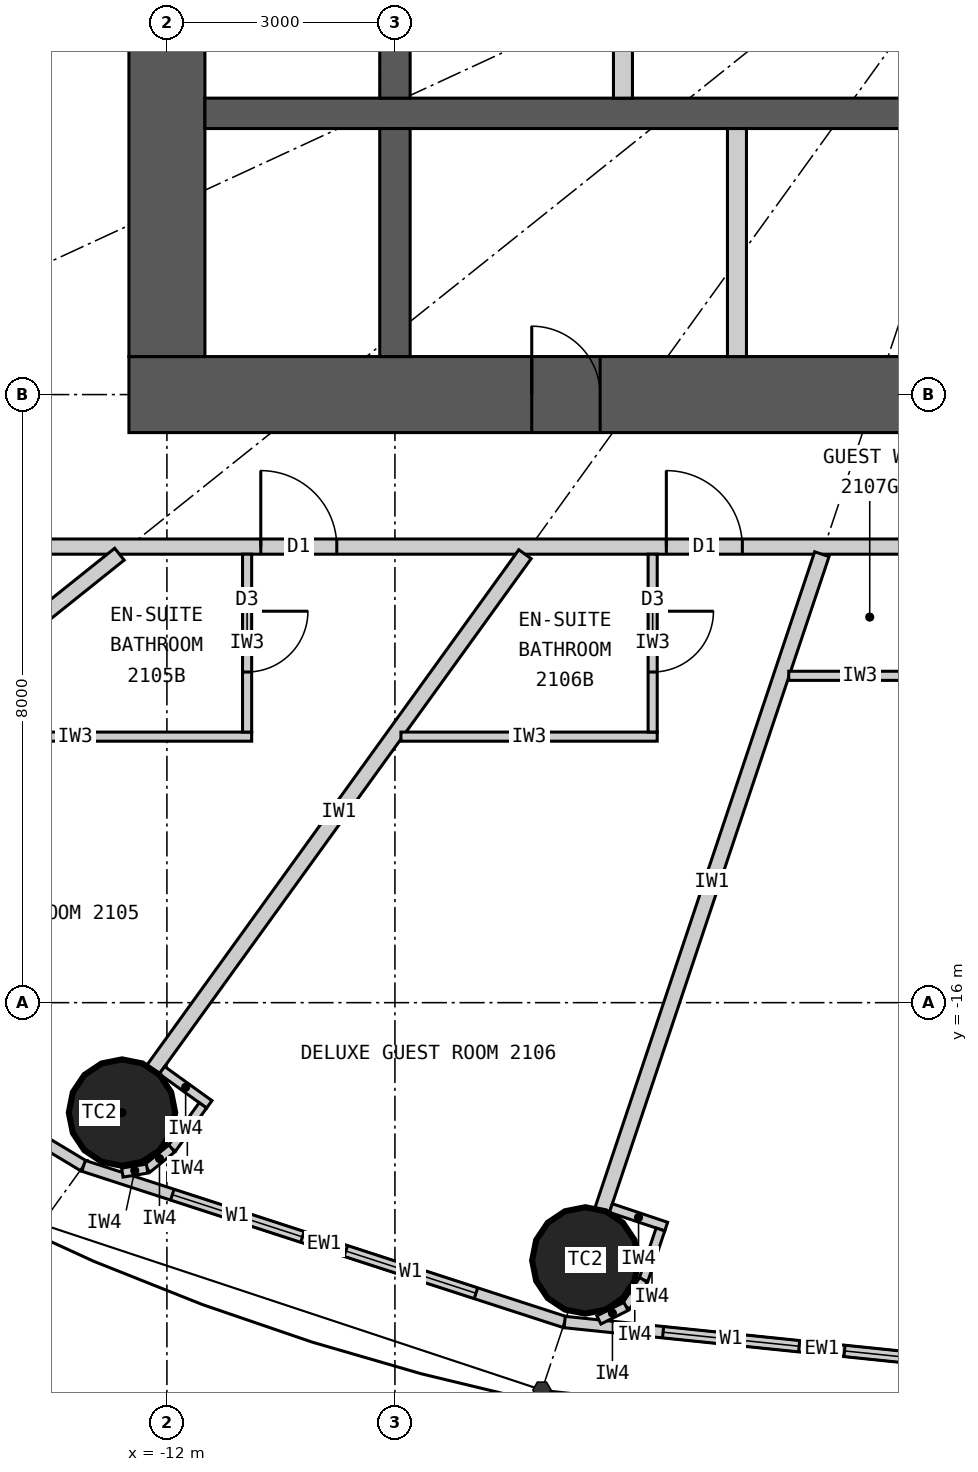
"""IFC4 building model, lengths in metres.
Left out: names, types, materials, properties, quantities, classifications, styles, units other than length and angle.
Written with IfcOpenShell. Run it as: python <this file> out.ifc"""

import sys

from ifc_helpers import new_model, si_unit, direction, frame, frame_2d, origin, origin_2d, place, context, subcontext, project, spatial, rectangle, circle, extrude, element, fill, save


model = new_model("IFC4")
c1 = context("Model", 3, precision=1e-05, world=origin(), true_north=direction((0.0, 1.0)))
c2 = subcontext(c1, "Body", "Model", "MODEL_VIEW")
j1 = project(units=[si_unit("LENGTHUNIT", "METRE"), si_unit("PLANEANGLEUNIT", "RADIAN")], contexts=[c1])
p1 = place(None, origin())
s1 = spatial("IfcSite", under=j1, at=p1, CompositionType="ELEMENT")
p2 = place(p1, origin())
s2 = spatial("IfcBuilding", under=s1, at=p2, CompositionType="ELEMENT")
p3 = place(p2, frame((0.0, 0.0, 83.7)))
s3 = spatial("IfcBuildingStorey", under=s2, at=p3, CompositionType="ELEMENT", Elevation=83.7)
for number, where, z_axis, x_axis in (
    (1, (-12.591, -17.447, 0.0), (0.0, 0.0, 1.0), (1.0, 0.0, 0.0)),
    (2, (-6.495, -19.391, 0.0), (0.0, 0.0, 1.0), (1.0, 0.0, 0.0)),
):
    element("IfcColumn", number, at=place(p3, frame(where, z_axis=z_axis, x_axis=x_axis)), inside=s3, PredefinedType="COLUMN", context=c2, shape_type="SweptSolid", body=[
        extrude(circle(Radius=0.7, at=origin_2d()), origin(), (0.0, 0.0, 1.0), 3.3),
    ])
p4 = place(p3, frame((12.5, -8.0, 0.0), z_axis=(0.0, 0.0, 1.0), x_axis=(-1.0, 0.0, 0.0)))
e3 = element("IfcWall", 3, at=p4, inside=s3, PredefinedType="SHEAR", context=c2, shape_type="SweptSolid", body=[
    extrude(rectangle(XDim=25.0, YDim=1.0, at=frame_2d((12.5, 0.0))), origin(), (0.0, 0.0, 1.0), 3.3),
])
p5 = place(p4, frame((11.2, 0.0, 0.0)))
e4 = element("IfcOpeningElement", 4, at=p5, cuts=e3, PredefinedType="OPENING", context=c2, shape_type="SweptSolid", body=[
    extrude(rectangle(XDim=1.2, YDim=2.2, at=frame_2d((0.6, 1.1))), frame((0.0, 0.51, 0.0), z_axis=(0.0, -1.0, 0.0), x_axis=(1.0, 0.0, 0.0)), (0.0, 0.0, 1.0), 1.02),
])
p6 = place(p4, frame((18.8, 0.0, 0.0)))
e5 = element("IfcOpeningElement", 5, at=p6, cuts=e3, PredefinedType="OPENING", context=c2, shape_type="SweptSolid", body=[
    extrude(rectangle(XDim=0.9, YDim=2.2, at=frame_2d((0.45, 1.1))), frame((0.0, 0.51, 0.0), z_axis=(0.0, -1.0, 0.0), x_axis=(1.0, 0.0, 0.0)), (0.0, 0.0, 1.0), 1.02),
])
p7 = place(p3, frame((-12.0, 7.5, 0.0), z_axis=(0.0, 0.0, 1.0), x_axis=(0.0, -1.0, 0.0)))
e6 = element("IfcWall", 6, at=p7, inside=s3, PredefinedType="SHEAR", context=c2, shape_type="SweptSolid", body=[
    extrude(rectangle(XDim=15.0, YDim=1.0, at=frame_2d((7.5, 0.0))), origin(), (0.0, 0.0, 1.0), 3.3),
])
p8 = place(p7, frame((6.6, 0.0, 0.0)))
e7 = element("IfcOpeningElement", 7, at=p8, cuts=e6, PredefinedType="OPENING", context=c2, shape_type="SweptSolid", body=[
    extrude(rectangle(XDim=1.8, YDim=2.2, at=frame_2d((0.9, 1.1))), frame((0.0, 0.51, 0.0), z_axis=(0.0, -1.0, 0.0), x_axis=(1.0, 0.0, 0.0)), (0.0, 0.0, 1.0), 1.02),
])
p9 = place(p3, frame((-11.5, -4.3, 0.0), z_axis=(0.0, 0.0, 1.0), x_axis=(1.0, 0.0, 0.0)))
e8 = element("IfcWall", 8, at=p9, inside=s3, PredefinedType="SHEAR", context=c2, shape_type="SweptSolid", body=[
    extrude(rectangle(XDim=23.0, YDim=0.4, at=frame_2d((11.5, 0.0))), origin(), (0.0, 0.0, 1.0), 3.3),
])
p10 = place(p3, frame((-9.0, -4.1, 0.0), z_axis=(0.0, 0.0, 1.0), x_axis=(0.0, 1.0, 0.0)))
e9 = element("IfcWall", 9, at=p10, inside=s3, PredefinedType="SHEAR", context=c2, shape_type="SweptSolid", body=[
    extrude(rectangle(XDim=2.35, YDim=0.4, at=frame_2d((1.175, 0.0))), origin(), (0.0, 0.0, 1.0), 3.3),
])
p11 = place(p3, frame((-9.0, -7.5, 0.0), z_axis=(0.0, 0.0, 1.0), x_axis=(0.0, 1.0, 0.0)))
e10 = element("IfcWall", 10, at=p11, inside=s3, PredefinedType="SHEAR", context=c2, shape_type="SweptSolid", body=[
    extrude(rectangle(XDim=3.0, YDim=0.4, at=frame_2d((1.5, 0.0))), origin(), (0.0, 0.0, 1.0), 3.3),
])
p12 = place(p3, frame((-4.5, -7.5, 0.0), z_axis=(0.0, 0.0, 1.0), x_axis=(0.0, 1.0, 0.0)))
e11 = element("IfcWall", 11, at=p12, inside=s3, PredefinedType="PARTITIONING", context=c2, shape_type="SweptSolid", body=[
    extrude(rectangle(XDim=3.0, YDim=0.25, at=frame_2d((1.5, 0.0))), origin(), (0.0, 0.0, 1.0), 3.3),
])
p13 = place(p3, frame((-6.0, -4.1, 0.0), z_axis=(0.0, 0.0, 1.0), x_axis=(0.0, 1.0, 0.0)))
e12 = element("IfcWall", 12, at=p13, inside=s3, PredefinedType="PARTITIONING", context=c2, shape_type="SweptSolid", body=[
    extrude(rectangle(XDim=2.35, YDim=0.25, at=frame_2d((1.175, 0.0))), origin(), (0.0, 0.0, 1.0), 3.3),
])
p14 = place(p3, frame((-18.57, -14.856, 0.0), z_axis=(0.0, 0.0, 1.0), x_axis=(0.856983180864, -0.515344377787, 0.0)))
e13 = element("IfcWall", 13, at=p14, inside=s3, PredefinedType="ELEMENTEDWALL", context=c2, shape_type="SweptSolid", body=[
    extrude(rectangle(XDim=6.386, YDim=0.15, at=frame_2d((3.193, 0.0))), origin(), (0.0, 0.0, 1.0), 3.12),
])
p15 = place(p14, frame((1.093, 0.0, 0.9)))
e14 = element("IfcOpeningElement", 14, at=p15, cuts=e13, PredefinedType="OPENING", context=c2, shape_type="SweptSolid", body=[
    extrude(rectangle(XDim=1.8, YDim=1.9, at=frame_2d((0.9, 0.95))), frame((0.0, 0.085, 0.0), z_axis=(0.0, -1.0, 0.0), x_axis=(1.0, 0.0, 0.0)), (0.0, 0.0, 1.0), 0.17),
])
p16 = place(p14, frame((3.493, 0.0, 0.9)))
e15 = element("IfcOpeningElement", 15, at=p16, cuts=e13, PredefinedType="OPENING", context=c2, shape_type="SweptSolid", body=[
    extrude(rectangle(XDim=1.8, YDim=1.9, at=frame_2d((0.9, 0.95))), frame((0.0, 0.085, 0.0), z_axis=(0.0, -1.0, 0.0), x_axis=(1.0, 0.0, 0.0)), (0.0, 0.0, 1.0), 0.17),
])
p17 = place(p3, frame((-13.096, -18.147, 0.0), z_axis=(0.0, 0.0, 1.0), x_axis=(0.951137534625, -0.308767534285, 0.0)))
e16 = element("IfcWall", 16, at=p17, inside=s3, PredefinedType="ELEMENTEDWALL", context=c2, shape_type="SweptSolid", body=[
    extrude(rectangle(XDim=6.655, YDim=0.15, at=frame_2d((3.328, 0.0))), origin(), (0.0, 0.0, 1.0), 3.12),
])
p18 = place(p17, frame((1.228, 0.0, 0.9)))
e17 = element("IfcOpeningElement", 17, at=p18, cuts=e16, PredefinedType="OPENING", context=c2, shape_type="SweptSolid", body=[
    extrude(rectangle(XDim=1.8, YDim=1.9, at=frame_2d((0.9, 0.95))), frame((0.0, 0.085, 0.0), z_axis=(0.0, -1.0, 0.0), x_axis=(1.0, 0.0, 0.0)), (0.0, 0.0, 1.0), 0.17),
])
p19 = place(p17, frame((3.628, 0.0, 0.9)))
e18 = element("IfcOpeningElement", 18, at=p19, cuts=e16, PredefinedType="OPENING", context=c2, shape_type="SweptSolid", body=[
    extrude(rectangle(XDim=1.8, YDim=1.9, at=frame_2d((0.9, 0.95))), frame((0.0, 0.085, 0.0), z_axis=(0.0, -1.0, 0.0), x_axis=(1.0, 0.0, 0.0)), (0.0, 0.0, 1.0), 0.17),
])
p20 = place(p3, frame((-6.766, -20.202, 0.0), z_axis=(0.0, 0.0, 1.0), x_axis=(0.994721394369, -0.102612609291, 0.0)))
e19 = element("IfcWall", 19, at=p20, inside=s3, PredefinedType="ELEMENTEDWALL", context=c2, shape_type="SweptSolid", body=[
    extrude(rectangle(XDim=6.802, YDim=0.15, at=frame_2d((3.401, 0.0))), origin(), (0.0, 0.0, 1.0), 3.12),
])
p21 = place(p20, frame((1.301, 0.0, 0.9)))
e20 = element("IfcOpeningElement", 20, at=p21, cuts=e19, PredefinedType="OPENING", context=c2, shape_type="SweptSolid", body=[
    extrude(rectangle(XDim=1.8, YDim=1.9, at=frame_2d((0.9, 0.95))), frame((0.0, 0.085, 0.0), z_axis=(0.0, -1.0, 0.0), x_axis=(1.0, 0.0, 0.0)), (0.0, 0.0, 1.0), 0.17),
])
p22 = place(p20, frame((3.701, 0.0, 0.9)))
e21 = element("IfcOpeningElement", 21, at=p22, cuts=e19, PredefinedType="OPENING", context=c2, shape_type="SweptSolid", body=[
    extrude(rectangle(XDim=1.8, YDim=1.9, at=frame_2d((0.9, 0.95))), frame((0.0, 0.085, 0.0), z_axis=(0.0, -1.0, 0.0), x_axis=(1.0, 0.0, 0.0)), (0.0, 0.0, 1.0), 0.17),
])
p23 = place(p3, frame((14.1, -10.0, 0.0), z_axis=(0.0, 0.0, 1.0), x_axis=(-1.0, 0.0, 0.0)))
e22 = element("IfcWall", 22, at=p23, inside=s3, PredefinedType="PARTITIONING", context=c2, shape_type="SweptSolid", body=[
    extrude(rectangle(XDim=28.2, YDim=0.2, at=frame_2d((14.1, 0.0))), origin(), (0.0, 0.0, 1.0), 3.12),
])
p24 = place(p23, frame((23.865, 0.0, 0.0)))
e23 = element("IfcOpeningElement", 23, at=p24, cuts=e22, PredefinedType="OPENING", context=c2, shape_type="SweptSolid", body=[
    extrude(rectangle(XDim=1.0, YDim=2.2, at=frame_2d((0.5, 1.1))), frame((0.0, 0.11, 0.0), z_axis=(0.0, -1.0, 0.0), x_axis=(1.0, 0.0, 0.0)), (0.0, 0.0, 1.0), 0.22),
])
p25 = place(p23, frame((18.529, 0.0, 0.0)))
e24 = element("IfcOpeningElement", 24, at=p25, cuts=e22, PredefinedType="OPENING", context=c2, shape_type="SweptSolid", body=[
    extrude(rectangle(XDim=1.0, YDim=2.2, at=frame_2d((0.5, 1.1))), frame((0.0, 0.11, 0.0), z_axis=(0.0, -1.0, 0.0), x_axis=(1.0, 0.0, 0.0)), (0.0, 0.0, 1.0), 0.22),
])
p26 = place(p23, frame((14.923, 0.0, 0.0)))
e25 = element("IfcOpeningElement", 25, at=p26, cuts=e22, PredefinedType="OPENING", context=c2, shape_type="SweptSolid", body=[
    extrude(rectangle(XDim=1.0, YDim=2.2, at=frame_2d((0.5, 1.1))), frame((0.0, 0.11, 0.0), z_axis=(0.0, -1.0, 0.0), x_axis=(1.0, 0.0, 0.0)), (0.0, 0.0, 1.0), 0.22),
])
p27 = place(p23, frame((2.801, 0.0, 0.0)))
e26 = element("IfcOpeningElement", 26, at=p27, cuts=e22, PredefinedType="OPENING", context=c2, shape_type="SweptSolid", body=[
    extrude(rectangle(XDim=1.0, YDim=2.2, at=frame_2d((0.5, 1.1))), frame((0.0, 0.11, 0.0), z_axis=(0.0, -1.0, 0.0), x_axis=(1.0, 0.0, 0.0)), (0.0, 0.0, 1.0), 0.22),
])
p28 = place(p3, frame((-12.625, -10.1, 0.0), z_axis=(0.0, 0.0, 1.0), x_axis=(-0.780892451574, -0.624665493744, 0.0)))
e27 = element("IfcWall", 27, at=p28, inside=s3, PredefinedType="PARTITIONING", context=c2, shape_type="SweptSolid", body=[
    extrude(rectangle(XDim=6.045, YDim=0.2, at=frame_2d((3.022, 0.0))), origin(), (0.0, 0.0, 1.0), 2.32),
])
p29 = place(p3, frame((-7.289, -10.1, 0.0), z_axis=(0.0, 0.0, 1.0), x_axis=(-0.585198353053, -0.810890182197, 0.0)))
e28 = element("IfcWall", 28, at=p29, inside=s3, PredefinedType="PARTITIONING", context=c2, shape_type="SweptSolid", body=[
    extrude(rectangle(XDim=8.36, YDim=0.2, at=frame_2d((4.18, 0.0))), origin(), (0.0, 0.0, 1.0), 2.32),
])
p30 = place(p3, frame((-3.383, -10.1, 0.0), z_axis=(0.0, 0.0, 1.0), x_axis=(-0.31759592231, -0.948226149256, 0.0)))
e29 = element("IfcWall", 29, at=p30, inside=s3, PredefinedType="PARTITIONING", context=c2, shape_type="SweptSolid", body=[
    extrude(rectangle(XDim=9.098, YDim=0.2, at=frame_2d((4.549, 0.0))), origin(), (0.0, 0.0, 1.0), 2.32),
])
p31 = place(p3, frame((-15.525, -12.5, 0.0), z_axis=(0.0, 0.0, 1.0), x_axis=(1.0, 0.0, 0.0)))
e30 = element("IfcWall", 30, at=p31, inside=s3, PredefinedType="PARTITIONING", context=c2, shape_type="SweptSolid", body=[
    extrude(rectangle(XDim=4.64, YDim=0.12, at=frame_2d((2.32, 0.0))), origin(), (0.0, 0.0, 1.0), 3.12),
])
p32 = place(p3, frame((-10.945, -10.1, 0.0), z_axis=(0.0, 0.0, 1.0), x_axis=(0.0, -1.0, 0.0)))
e31 = element("IfcWall", 31, at=p32, inside=s3, PredefinedType="PARTITIONING", context=c2, shape_type="SweptSolid", body=[
    extrude(rectangle(XDim=2.34, YDim=0.12, at=frame_2d((1.17, 0.0))), origin(), (0.0, 0.0, 1.0), 3.12),
])
p33 = place(p32, frame((0.75, 0.0, 0.0)))
e32 = element("IfcOpeningElement", 32, at=p33, cuts=e31, PredefinedType="OPENING", context=c2, shape_type="SweptSolid", body=[
    extrude(rectangle(XDim=0.8, YDim=2.1, at=frame_2d((0.4, 1.05))), frame((0.0, 0.07, 0.0), z_axis=(0.0, -1.0, 0.0), x_axis=(1.0, 0.0, 0.0)), (0.0, 0.0, 1.0), 0.14),
])
p34 = place(p3, frame((-8.921, -12.5, 0.0), z_axis=(0.0, 0.0, 1.0), x_axis=(1.0, 0.0, 0.0)))
e33 = element("IfcWall", 33, at=p34, inside=s3, PredefinedType="PARTITIONING", context=c2, shape_type="SweptSolid", body=[
    extrude(rectangle(XDim=3.372, YDim=0.12, at=frame_2d((1.686, 0.0))), origin(), (0.0, 0.0, 1.0), 3.12),
])
p35 = place(p3, frame((-5.609, -10.1, 0.0), z_axis=(0.0, 0.0, 1.0), x_axis=(0.0, -1.0, 0.0)))
e34 = element("IfcWall", 34, at=p35, inside=s3, PredefinedType="PARTITIONING", context=c2, shape_type="SweptSolid", body=[
    extrude(rectangle(XDim=2.34, YDim=0.12, at=frame_2d((1.17, 0.0))), origin(), (0.0, 0.0, 1.0), 3.12),
])
p36 = place(p35, frame((0.75, 0.0, 0.0)))
e35 = element("IfcOpeningElement", 35, at=p36, cuts=e34, PredefinedType="OPENING", context=c2, shape_type="SweptSolid", body=[
    extrude(rectangle(XDim=0.8, YDim=2.1, at=frame_2d((0.4, 1.05))), frame((0.0, 0.07, 0.0), z_axis=(0.0, -1.0, 0.0), x_axis=(1.0, 0.0, 0.0)), (0.0, 0.0, 1.0), 0.14),
])
p37 = place(p3, frame((-3.819, -11.7, 0.0), z_axis=(0.0, 0.0, 1.0), x_axis=(1.0, 0.0, 0.0)))
e36 = element("IfcWall", 36, at=p37, inside=s3, PredefinedType="PARTITIONING", context=c2, shape_type="SweptSolid", body=[
    extrude(rectangle(XDim=1.876, YDim=0.12, at=frame_2d((0.938, 0.0))), origin(), (0.0, 0.0, 1.0), 3.12),
])
p38 = place(p3, frame((-12.065, -16.889, 0.0), z_axis=(0.0, 0.0, 1.0), x_axis=(0.810821798253, -0.585293098778, 0.0)))
e37 = element("IfcWall", 37, at=p38, inside=s3, PredefinedType="PARTITIONING", context=c2, shape_type="SweptSolid", body=[
    extrude(rectangle(XDim=0.768, YDim=0.12, at=frame_2d((0.384, 0.0))), origin(), (0.0, 0.0, 1.0), 3.12),
])
p39 = place(p3, frame((-11.526, -17.351, 0.0), z_axis=(0.0, 0.0, 1.0), x_axis=(-0.585223113993, -0.810872312296, 0.0)))
e38 = element("IfcWall", 38, at=p39, inside=s3, PredefinedType="PARTITIONING", context=c2, shape_type="SweptSolid", body=[
    extrude(rectangle(XDim=0.7, YDim=0.12, at=frame_2d((0.35, 0.0))), origin(), (0.0, 0.0, 1.0), 3.12),
])
p40 = place(p3, frame((-11.936, -17.919, 0.0), z_axis=(0.0, 0.0, 1.0), x_axis=(-0.775023088441, -0.631932917629, 0.0)))
e39 = element("IfcWall", 39, at=p40, inside=s3, PredefinedType="PARTITIONING", context=c2, shape_type="SweptSolid", body=[
    extrude(rectangle(XDim=0.418, YDim=0.12, at=frame_2d((0.209, 0.0))), origin(), (0.0, 0.0, 1.0), 3.12),
])
p41 = place(p3, frame((-12.26, -18.183, 0.0), z_axis=(0.0, 0.0, 1.0), x_axis=(-0.987218661664, -0.159371622511, 0.0)))
e40 = element("IfcWall", 40, at=p41, inside=s3, PredefinedType="PARTITIONING", context=c2, shape_type="SweptSolid", body=[
    extrude(rectangle(XDim=0.331, YDim=0.12, at=frame_2d((0.166, 0.0))), origin(), (0.0, 0.0, 1.0), 3.12),
])
p42 = place(p3, frame((-6.159, -18.702, 0.0), z_axis=(0.0, 0.0, 1.0), x_axis=(0.948173154049, -0.31775410295, 0.0)))
e41 = element("IfcWall", 41, at=p42, inside=s3, PredefinedType="PARTITIONING", context=c2, shape_type="SweptSolid", body=[
    extrude(rectangle(XDim=0.768, YDim=0.12, at=frame_2d((0.384, 0.0))), origin(), (0.0, 0.0, 1.0), 3.12),
])
p43 = place(p3, frame((-5.507, -18.984, 0.0), z_axis=(0.0, 0.0, 1.0), x_axis=(-0.317692050622, -0.948193946918, 0.0)))
e42 = element("IfcWall", 42, at=p43, inside=s3, PredefinedType="PARTITIONING", context=c2, shape_type="SweptSolid", body=[
    extrude(rectangle(XDim=0.7, YDim=0.12, at=frame_2d((0.35, 0.0))), origin(), (0.0, 0.0, 1.0), 3.12),
])
p44 = place(p3, frame((-5.729, -19.648, 0.0), z_axis=(0.0, 0.0, 1.0), x_axis=(-0.552135764955, -0.833754218615, 0.0)))
e43 = element("IfcWall", 43, at=p44, inside=s3, PredefinedType="PARTITIONING", context=c2, shape_type="SweptSolid", body=[
    extrude(rectangle(XDim=0.418, YDim=0.12, at=frame_2d((0.209, 0.0))), origin(), (0.0, 0.0, 1.0), 3.12),
])
p45 = place(p3, frame((-5.96, -19.996, 0.0), z_axis=(0.0, 0.0, 1.0), x_axis=(-0.895160725913, -0.445743507842, 0.0)))
e44 = element("IfcWall", 44, at=p45, inside=s3, PredefinedType="PARTITIONING", context=c2, shape_type="SweptSolid", body=[
    extrude(rectangle(XDim=0.399, YDim=0.12, at=frame_2d((0.199, 0.0))), origin(), (0.0, 0.0, 1.0), 3.12),
])
p46 = place(p18, origin())
e45 = element("IfcWindow", 45, at=p46, inside=s3, PartitioningType="SINGLE_PANEL", PredefinedType="WINDOW", context=c2, shape_type="SweptSolid", body=[
    extrude(rectangle(XDim=1.8, YDim=1.9, at=frame_2d((0.9, 0.95))), frame((0.0, 0.03, 0.0), z_axis=(0.0, -1.0, 0.0), x_axis=(1.0, 0.0, 0.0)), (0.0, 0.0, 1.0), 0.06),
])
fill(e17, e45)
p47 = place(p19, origin())
e46 = element("IfcWindow", 46, at=p47, inside=s3, PartitioningType="SINGLE_PANEL", PredefinedType="WINDOW", context=c2, shape_type="SweptSolid", body=[
    extrude(rectangle(XDim=1.8, YDim=1.9, at=frame_2d((0.9, 0.95))), frame((0.0, 0.03, 0.0), z_axis=(0.0, -1.0, 0.0), x_axis=(1.0, 0.0, 0.0)), (0.0, 0.0, 1.0), 0.06),
])
fill(e18, e46)
p48 = place(p21, origin())
e47 = element("IfcWindow", 47, at=p48, inside=s3, PartitioningType="SINGLE_PANEL", PredefinedType="WINDOW", context=c2, shape_type="SweptSolid", body=[
    extrude(rectangle(XDim=1.8, YDim=1.9, at=frame_2d((0.9, 0.95))), frame((0.0, 0.03, 0.0), z_axis=(0.0, -1.0, 0.0), x_axis=(1.0, 0.0, 0.0)), (0.0, 0.0, 1.0), 0.06),
])
fill(e20, e47)
p49 = place(p22, origin())
e48 = element("IfcWindow", 48, at=p49, inside=s3, PartitioningType="SINGLE_PANEL", PredefinedType="WINDOW", context=c2, shape_type="SweptSolid", body=[
    extrude(rectangle(XDim=1.8, YDim=1.9, at=frame_2d((0.9, 0.95))), frame((0.0, 0.03, 0.0), z_axis=(0.0, -1.0, 0.0), x_axis=(1.0, 0.0, 0.0)), (0.0, 0.0, 1.0), 0.06),
])
fill(e21, e48)
p50 = place(p33, origin())
e49 = element("IfcDoor", 49, at=p50, inside=s3, OperationType="SINGLE_SWING_LEFT", PredefinedType="DOOR", context=c2, shape_type="SweptSolid", body=[
    extrude(rectangle(XDim=0.8, YDim=2.1, at=frame_2d((0.4, 1.05))), frame((0.0, 0.025, 0.0), z_axis=(0.0, -1.0, 0.0), x_axis=(1.0, 0.0, 0.0)), (0.0, 0.0, 1.0), 0.05),
])
fill(e32, e49)
p51 = place(p24, origin())
e50 = element("IfcDoor", 50, at=p51, inside=s3, OperationType="SINGLE_SWING_RIGHT", PredefinedType="DOOR", context=c2, shape_type="SweptSolid", body=[
    extrude(rectangle(XDim=1.0, YDim=2.2, at=frame_2d((0.5, 1.1))), frame((0.0, 0.025, 0.0), z_axis=(0.0, -1.0, 0.0), x_axis=(1.0, 0.0, 0.0)), (0.0, 0.0, 1.0), 0.05),
])
fill(e23, e50)
p52 = place(p36, origin())
e51 = element("IfcDoor", 51, at=p52, inside=s3, OperationType="SINGLE_SWING_LEFT", PredefinedType="DOOR", context=c2, shape_type="SweptSolid", body=[
    extrude(rectangle(XDim=0.8, YDim=2.1, at=frame_2d((0.4, 1.05))), frame((0.0, 0.025, 0.0), z_axis=(0.0, -1.0, 0.0), x_axis=(1.0, 0.0, 0.0)), (0.0, 0.0, 1.0), 0.05),
])
fill(e35, e51)
p53 = place(p25, origin())
e52 = element("IfcDoor", 52, at=p53, inside=s3, OperationType="SINGLE_SWING_RIGHT", PredefinedType="DOOR", context=c2, shape_type="SweptSolid", body=[
    extrude(rectangle(XDim=1.0, YDim=2.2, at=frame_2d((0.5, 1.1))), frame((0.0, 0.025, 0.0), z_axis=(0.0, -1.0, 0.0), x_axis=(1.0, 0.0, 0.0)), (0.0, 0.0, 1.0), 0.05),
])
fill(e24, e52)
p54 = place(p6, origin())
e53 = element("IfcDoor", 53, at=p54, inside=s3, OperationType="SINGLE_SWING_RIGHT", PredefinedType="DOOR", context=c2, shape_type="SweptSolid", body=[
    extrude(rectangle(XDim=0.9, YDim=2.2, at=frame_2d((0.45, 1.1))), frame((0.0, 0.025, 0.0), z_axis=(0.0, -1.0, 0.0), x_axis=(1.0, 0.0, 0.0)), (0.0, 0.0, 1.0), 0.05),
])
fill(e5, e53)
save(model, sys.argv[1])
